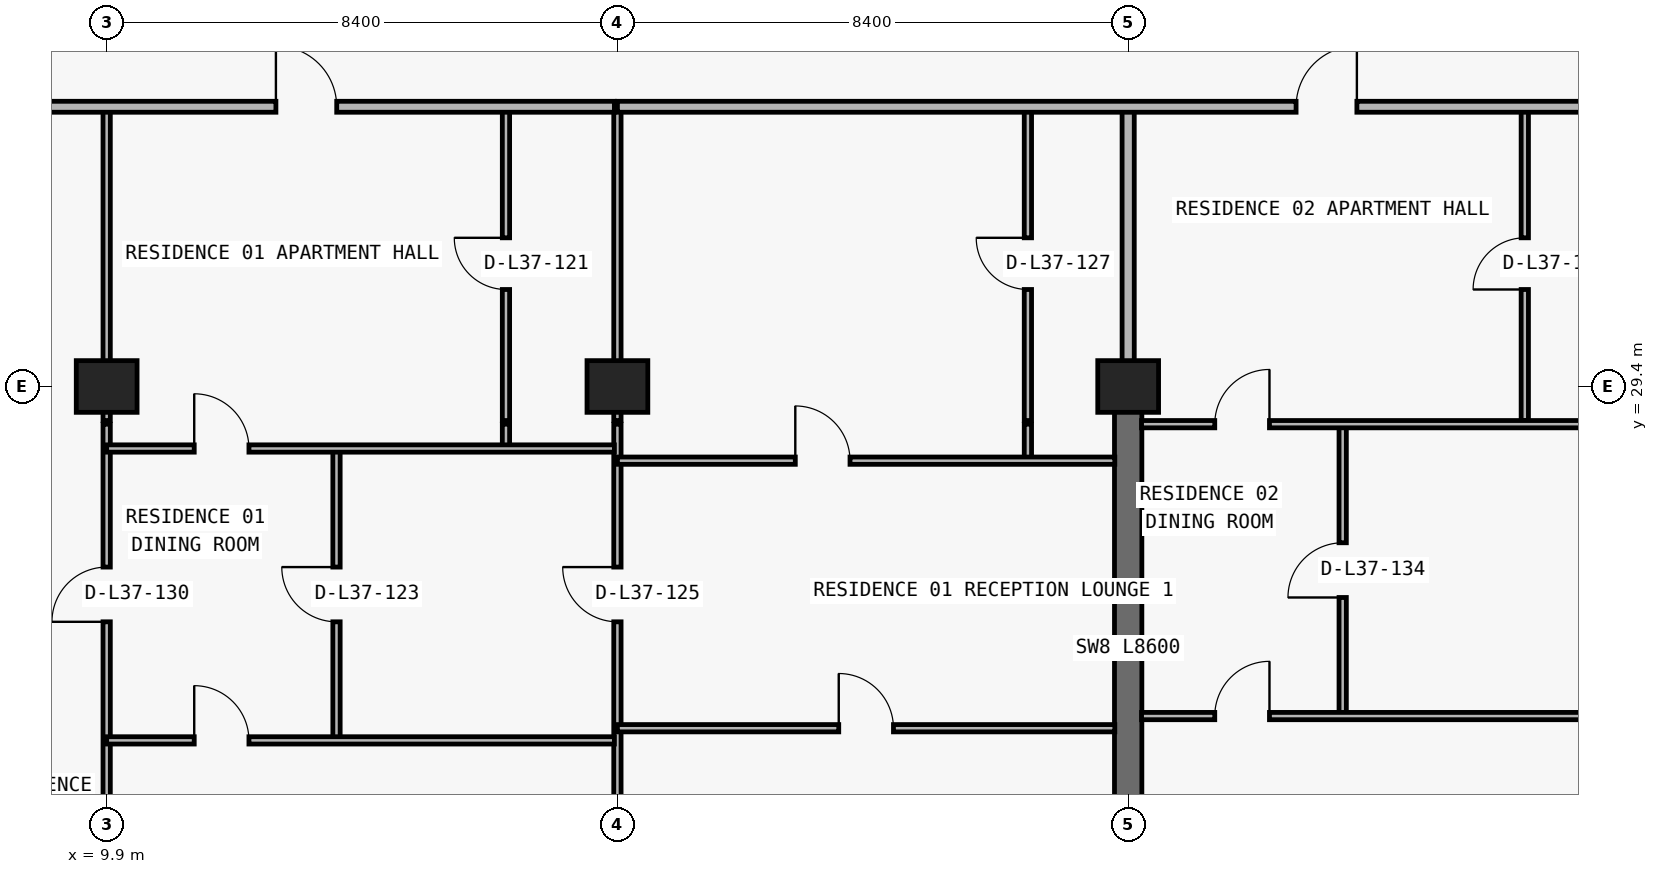
"""IFC4 building model, lengths in metres.
Left out: names, types, materials, properties, quantities, classifications, styles, units other than length and angle.
Written with IfcOpenShell. Run it as: python <this file> out.ifc"""

import sys

from ifc_helpers import new_model, si_unit, direction, frame, frame_2d, origin, origin_2d, place, context, subcontext, project, spatial, rectangle, extrude, element, fill, save


model = new_model("IFC4")
c1 = context("Model", 3, precision=1e-05, world=origin(), true_north=direction((0.0, 1.0)))
c2 = subcontext(c1, "Body", "Model", "MODEL_VIEW")
j1 = project(units=[si_unit("LENGTHUNIT", "METRE"), si_unit("PLANEANGLEUNIT", "RADIAN")], contexts=[c1])
p1 = place(None, origin())
s1 = spatial("IfcSite", under=j1, at=p1, CompositionType="ELEMENT")
p2 = place(p1, origin())
s2 = spatial("IfcBuilding", under=s1, at=p2, CompositionType="ELEMENT")
p3 = place(p2, frame((0.0, 0.0, 135.6)))
s3 = spatial("IfcBuildingStorey", under=s2, at=p3, CompositionType="ELEMENT", Elevation=135.6)
for number, where, z_axis, x_axis in (
    (1, (9.9, 29.4, 0.0), (0.0, 0.0, 1.0), (1.0, 0.0, 0.0)),
    (2, (18.3, 29.4, 0.0), (0.0, 0.0, 1.0), (1.0, 0.0, 0.0)),
    (3, (26.7, 29.4, 0.0), (0.0, 0.0, 1.0), (1.0, 0.0, 0.0)),
):
    element("IfcColumn", number, at=place(p3, frame(where, z_axis=z_axis, x_axis=x_axis)), inside=s3, PredefinedType="COLUMN", context=c2, shape_type="SweptSolid", body=[
        extrude(rectangle(XDim=1.0, YDim=0.85, at=origin_2d()), origin(), (0.0, 0.0, 1.0), 3.05),
    ])
p4 = place(p3, frame((26.7, 20.8, 0.0), z_axis=(0.0, 0.0, 1.0), x_axis=(0.0, 1.0, 0.0)))
e4 = element("IfcWall", 4, at=p4, inside=s3, PredefinedType="SHEAR", context=c2, shape_type="SweptSolid", body=[
    extrude(rectangle(XDim=8.6, YDim=0.45, at=frame_2d((4.3, 0.0))), origin(), (0.0, 0.0, 1.0), 3.05),
])
p5 = place(p3, frame((9.9, 8.84, 0.0), z_axis=(0.0, 0.0, 1.0), x_axis=(0.0, 1.0, 0.0)))
e5 = element("IfcWall", 5, at=p5, inside=s3, PredefinedType="PARTITIONING", context=c2, shape_type="SweptSolid", body=[
    extrude(rectangle(XDim=19.94, YDim=0.12, at=frame_2d((9.97, 0.0))), origin(), (0.0, 0.0, 1.0), 2.174),
])
p6 = place(p5, frame((16.69, 0.0, 0.0)))
e6 = element("IfcOpeningElement", 6, at=p6, cuts=e5, PredefinedType="OPENING", context=c2, shape_type="SweptSolid", body=[
    extrude(rectangle(XDim=0.9, YDim=2.124, at=frame_2d((0.45, 1.062))), frame((0.0, 0.07, 0.0), z_axis=(0.0, -1.0, 0.0), x_axis=(1.0, 0.0, 0.0)), (0.0, 0.0, 1.0), 0.14),
])
p7 = place(p3, frame((9.9, 28.84, 0.0), z_axis=(0.0, 0.0, 1.0), x_axis=(0.0, 1.0, 0.0)))
e7 = element("IfcWall", 7, at=p7, inside=s3, PredefinedType="PARTITIONING", context=c2, shape_type="SweptSolid", body=[
    extrude(rectangle(XDim=5.16, YDim=0.12, at=frame_2d((2.58, 0.0))), origin(), (0.0, 0.0, 1.0), 2.174),
])
p8 = place(p3, frame((13.68, 23.58, 0.0), z_axis=(0.0, 0.0, 1.0), x_axis=(0.0, 1.0, 0.0)))
e8 = element("IfcWall", 8, at=p8, inside=s3, PredefinedType="PARTITIONING", context=c2, shape_type="SweptSolid", body=[
    extrude(rectangle(XDim=4.8, YDim=0.12, at=frame_2d((2.4, 0.0))), origin(), (0.0, 0.0, 1.0), 3.05),
])
p9 = place(p8, frame((1.95, 0.0, 0.0)))
e9 = element("IfcOpeningElement", 9, at=p9, cuts=e8, PredefinedType="OPENING", context=c2, shape_type="SweptSolid", body=[
    extrude(rectangle(XDim=0.9, YDim=2.15, at=frame_2d((0.45, 1.075))), frame((0.0, 0.07, 0.0), z_axis=(0.0, -1.0, 0.0), x_axis=(1.0, 0.0, 0.0)), (0.0, 0.0, 1.0), 0.14),
])
p10 = place(p3, frame((16.467, 28.38, 0.0), z_axis=(0.0, 0.0, 1.0), x_axis=(0.0, 1.0, 0.0)))
e10 = element("IfcWall", 10, at=p10, inside=s3, PredefinedType="PARTITIONING", context=c2, shape_type="SweptSolid", body=[
    extrude(rectangle(XDim=0.4, YDim=0.12, at=frame_2d((0.2, 0.0))), origin(), (0.0, 0.0, 1.0), 2.679),
])
p11 = place(p3, frame((16.467, 28.84, 0.0), z_axis=(0.0, 0.0, 1.0), x_axis=(0.0, 1.0, 0.0)))
e11 = element("IfcWall", 11, at=p11, inside=s3, PredefinedType="PARTITIONING", context=c2, shape_type="SweptSolid", body=[
    extrude(rectangle(XDim=5.16, YDim=0.12, at=frame_2d((2.58, 0.0))), origin(), (0.0, 0.0, 1.0), 2.679),
])
p12 = place(p11, frame((2.155, 0.0, 0.0)))
e12 = element("IfcOpeningElement", 12, at=p12, cuts=e11, PredefinedType="OPENING", context=c2, shape_type="SweptSolid", body=[
    extrude(rectangle(XDim=0.85, YDim=2.1, at=frame_2d((0.425, 1.05))), frame((0.0, 0.07, 0.0), z_axis=(0.0, -1.0, 0.0), x_axis=(1.0, 0.0, 0.0)), (0.0, 0.0, 1.0), 0.14),
])
p13 = place(p3, frame((18.3, 8.84, 0.0), z_axis=(0.0, 0.0, 1.0), x_axis=(0.0, 1.0, 0.0)))
e13 = element("IfcWall", 13, at=p13, inside=s3, PredefinedType="PARTITIONING", context=c2, shape_type="SweptSolid", body=[
    extrude(rectangle(XDim=19.94, YDim=0.12, at=frame_2d((9.97, 0.0))), origin(), (0.0, 0.0, 1.0), 2.174),
])
p14 = place(p13, frame((16.69, 0.0, 0.0)))
e14 = element("IfcOpeningElement", 14, at=p14, cuts=e13, PredefinedType="OPENING", context=c2, shape_type="SweptSolid", body=[
    extrude(rectangle(XDim=0.9, YDim=2.124, at=frame_2d((0.45, 1.062))), frame((0.0, 0.07, 0.0), z_axis=(0.0, -1.0, 0.0), x_axis=(1.0, 0.0, 0.0)), (0.0, 0.0, 1.0), 0.14),
])
p15 = place(p3, frame((18.3, 28.84, 0.0), z_axis=(0.0, 0.0, 1.0), x_axis=(0.0, 1.0, 0.0)))
e15 = element("IfcWall", 15, at=p15, inside=s3, PredefinedType="PARTITIONING", context=c2, shape_type="SweptSolid", body=[
    extrude(rectangle(XDim=5.16, YDim=0.12, at=frame_2d((2.58, 0.0))), origin(), (0.0, 0.0, 1.0), 2.174),
])
p16 = place(p3, frame((25.051, 28.18, 0.0), z_axis=(0.0, 0.0, 1.0), x_axis=(0.0, 1.0, 0.0)))
e16 = element("IfcWall", 16, at=p16, inside=s3, PredefinedType="PARTITIONING", context=c2, shape_type="SweptSolid", body=[
    extrude(rectangle(XDim=0.6, YDim=0.12, at=frame_2d((0.3, 0.0))), origin(), (0.0, 0.0, 1.0), 3.05),
])
p17 = place(p3, frame((25.051, 28.84, 0.0), z_axis=(0.0, 0.0, 1.0), x_axis=(0.0, 1.0, 0.0)))
e17 = element("IfcWall", 17, at=p17, inside=s3, PredefinedType="PARTITIONING", context=c2, shape_type="SweptSolid", body=[
    extrude(rectangle(XDim=5.16, YDim=0.12, at=frame_2d((2.58, 0.0))), origin(), (0.0, 0.0, 1.0), 3.05),
])
p18 = place(p17, frame((2.155, 0.0, 0.0)))
e18 = element("IfcOpeningElement", 18, at=p18, cuts=e17, PredefinedType="OPENING", context=c2, shape_type="SweptSolid", body=[
    extrude(rectangle(XDim=0.85, YDim=2.1, at=frame_2d((0.425, 1.05))), frame((0.0, 0.07, 0.0), z_axis=(0.0, -1.0, 0.0), x_axis=(1.0, 0.0, 0.0)), (0.0, 0.0, 1.0), 0.14),
])
p19 = place(p3, frame((26.7, 29.405, 0.0), z_axis=(0.0, 0.0, 1.0), x_axis=(0.0, 1.0, 0.0)))
e19 = element("IfcWall", 19, at=p19, inside=s3, PredefinedType="PARTITIONING", context=c2, shape_type="SweptSolid", body=[
    extrude(rectangle(XDim=4.595, YDim=0.2, at=frame_2d((2.297, 0.0))), origin(), (0.0, 0.0, 1.0), 2.335),
])
p20 = place(p3, frame((30.228, 23.98, 0.0), z_axis=(0.0, 0.0, 1.0), x_axis=(0.0, 1.0, 0.0)))
e20 = element("IfcWall", 20, at=p20, inside=s3, PredefinedType="PARTITIONING", context=c2, shape_type="SweptSolid", body=[
    extrude(rectangle(XDim=4.8, YDim=0.12, at=frame_2d((2.4, 0.0))), origin(), (0.0, 0.0, 1.0), 3.05),
])
p21 = place(p20, frame((1.95, 0.0, 0.0)))
e21 = element("IfcOpeningElement", 21, at=p21, cuts=e20, PredefinedType="OPENING", context=c2, shape_type="SweptSolid", body=[
    extrude(rectangle(XDim=0.9, YDim=2.15, at=frame_2d((0.45, 1.075))), frame((0.0, 0.07, 0.0), z_axis=(0.0, -1.0, 0.0), x_axis=(1.0, 0.0, 0.0)), (0.0, 0.0, 1.0), 0.14),
])
p22 = place(p3, frame((33.223, 28.84, 0.0), z_axis=(0.0, 0.0, 1.0), x_axis=(0.0, 1.0, 0.0)))
e22 = element("IfcWall", 22, at=p22, inside=s3, PredefinedType="PARTITIONING", context=c2, shape_type="SweptSolid", body=[
    extrude(rectangle(XDim=5.16, YDim=0.12, at=frame_2d((2.58, 0.0))), origin(), (0.0, 0.0, 1.0), 2.679),
])
p23 = place(p22, frame((2.155, 0.0, 0.0)))
e23 = element("IfcOpeningElement", 23, at=p23, cuts=e22, PredefinedType="OPENING", context=c2, shape_type="SweptSolid", body=[
    extrude(rectangle(XDim=0.85, YDim=2.1, at=frame_2d((0.425, 1.05))), frame((0.0, 0.07, 0.0), z_axis=(0.0, -1.0, 0.0), x_axis=(1.0, 0.0, 0.0)), (0.0, 0.0, 1.0), 0.14),
])
p24 = place(p3, frame((9.9, 23.58, 0.0), z_axis=(0.0, 0.0, 1.0), x_axis=(1.0, 0.0, 0.0)))
e24 = element("IfcWall", 24, at=p24, inside=s3, PredefinedType="PARTITIONING", context=c2, shape_type="SweptSolid", body=[
    extrude(rectangle(XDim=8.35, YDim=0.12, at=frame_2d((4.175, 0.0))), origin(), (0.0, 0.0, 1.0), 3.05),
])
p25 = place(p24, frame((1.44, 0.0, 0.0)))
e25 = element("IfcOpeningElement", 25, at=p25, cuts=e24, PredefinedType="OPENING", context=c2, shape_type="SweptSolid", body=[
    extrude(rectangle(XDim=0.9, YDim=2.15, at=frame_2d((0.45, 1.075))), frame((0.0, 0.07, 0.0), z_axis=(0.0, -1.0, 0.0), x_axis=(1.0, 0.0, 0.0)), (0.0, 0.0, 1.0), 0.14),
])
p26 = place(p3, frame((18.3, 23.78, 0.0), z_axis=(0.0, 0.0, 1.0), x_axis=(1.0, 0.0, 0.0)))
e26 = element("IfcWall", 26, at=p26, inside=s3, PredefinedType="PARTITIONING", context=c2, shape_type="SweptSolid", body=[
    extrude(rectangle(XDim=8.18, YDim=0.12, at=frame_2d((4.09, 0.0))), origin(), (0.0, 0.0, 1.0), 3.05),
])
p27 = place(p26, frame((3.64, 0.0, 0.0)))
e27 = element("IfcOpeningElement", 27, at=p27, cuts=e26, PredefinedType="OPENING", context=c2, shape_type="SweptSolid", body=[
    extrude(rectangle(XDim=0.9, YDim=2.15, at=frame_2d((0.45, 1.075))), frame((0.0, 0.07, 0.0), z_axis=(0.0, -1.0, 0.0), x_axis=(1.0, 0.0, 0.0)), (0.0, 0.0, 1.0), 0.14),
])
p28 = place(p3, frame((26.92, 23.98, 0.0), z_axis=(0.0, 0.0, 1.0), x_axis=(1.0, 0.0, 0.0)))
e28 = element("IfcWall", 28, at=p28, inside=s3, PredefinedType="PARTITIONING", context=c2, shape_type="SweptSolid", body=[
    extrude(rectangle(XDim=8.18, YDim=0.12, at=frame_2d((4.09, 0.0))), origin(), (0.0, 0.0, 1.0), 3.05),
])
p29 = place(p28, frame((1.204, 0.0, 0.0)))
e29 = element("IfcOpeningElement", 29, at=p29, cuts=e28, PredefinedType="OPENING", context=c2, shape_type="SweptSolid", body=[
    extrude(rectangle(XDim=0.9, YDim=2.15, at=frame_2d((0.45, 1.075))), frame((0.0, 0.07, 0.0), z_axis=(0.0, -1.0, 0.0), x_axis=(1.0, 0.0, 0.0)), (0.0, 0.0, 1.0), 0.14),
])
p30 = place(p3, frame((18.3, 28.18, 0.0), z_axis=(0.0, 0.0, 1.0), x_axis=(1.0, 0.0, 0.0)))
e30 = element("IfcWall", 30, at=p30, inside=s3, PredefinedType="PARTITIONING", context=c2, shape_type="SweptSolid", body=[
    extrude(rectangle(XDim=8.18, YDim=0.12, at=frame_2d((4.09, 0.0))), origin(), (0.0, 0.0, 1.0), 3.05),
])
p31 = place(p30, frame((2.926, 0.0, 0.0)))
e31 = element("IfcOpeningElement", 31, at=p31, cuts=e30, PredefinedType="OPENING", context=c2, shape_type="SweptSolid", body=[
    extrude(rectangle(XDim=0.9, YDim=2.15, at=frame_2d((0.45, 1.075))), frame((0.0, 0.07, 0.0), z_axis=(0.0, -1.0, 0.0), x_axis=(1.0, 0.0, 0.0)), (0.0, 0.0, 1.0), 0.14),
])
p32 = place(p3, frame((9.9, 28.38, 0.0), z_axis=(0.0, 0.0, 1.0), x_axis=(1.0, 0.0, 0.0)))
e32 = element("IfcWall", 32, at=p32, inside=s3, PredefinedType="PARTITIONING", context=c2, shape_type="SweptSolid", body=[
    extrude(rectangle(XDim=8.35, YDim=0.12, at=frame_2d((4.175, 0.0))), origin(), (0.0, 0.0, 1.0), 3.05),
])
p33 = place(p32, frame((1.44, 0.0, 0.0)))
e33 = element("IfcOpeningElement", 33, at=p33, cuts=e32, PredefinedType="OPENING", context=c2, shape_type="SweptSolid", body=[
    extrude(rectangle(XDim=0.9, YDim=2.15, at=frame_2d((0.45, 1.075))), frame((0.0, 0.07, 0.0), z_axis=(0.0, -1.0, 0.0), x_axis=(1.0, 0.0, 0.0)), (0.0, 0.0, 1.0), 0.14),
])
p34 = place(p3, frame((26.92, 28.78, 0.0), z_axis=(0.0, 0.0, 1.0), x_axis=(1.0, 0.0, 0.0)))
e34 = element("IfcWall", 34, at=p34, inside=s3, PredefinedType="PARTITIONING", context=c2, shape_type="SweptSolid", body=[
    extrude(rectangle(XDim=8.18, YDim=0.12, at=frame_2d((4.09, 0.0))), origin(), (0.0, 0.0, 1.0), 3.05),
])
p35 = place(p34, frame((1.204, 0.0, 0.0)))
e35 = element("IfcOpeningElement", 35, at=p35, cuts=e34, PredefinedType="OPENING", context=c2, shape_type="SweptSolid", body=[
    extrude(rectangle(XDim=0.9, YDim=2.15, at=frame_2d((0.45, 1.075))), frame((0.0, 0.07, 0.0), z_axis=(0.0, -1.0, 0.0), x_axis=(1.0, 0.0, 0.0)), (0.0, 0.0, 1.0), 0.14),
])
p36 = place(p3, frame((7.705, 34.0, 0.0), z_axis=(0.0, 0.0, 1.0), x_axis=(1.0, 0.0, 0.0)))
e36 = element("IfcWall", 36, at=p36, inside=s3, PredefinedType="PARTITIONING", context=c2, shape_type="SweptSolid", body=[
    extrude(rectangle(XDim=10.545, YDim=0.18, at=frame_2d((5.272, 0.0))), origin(), (0.0, 0.0, 1.0), 3.05),
])
p37 = place(p36, frame((4.979, 0.0, 0.0)))
e37 = element("IfcOpeningElement", 37, at=p37, cuts=e36, PredefinedType="OPENING", context=c2, shape_type="SweptSolid", body=[
    extrude(rectangle(XDim=1.0, YDim=2.2, at=frame_2d((0.5, 1.1))), frame((0.0, 0.1, 0.0), z_axis=(0.0, -1.0, 0.0), x_axis=(1.0, 0.0, 0.0)), (0.0, 0.0, 1.0), 0.2),
])
p38 = place(p3, frame((18.3, 34.0, 0.0), z_axis=(0.0, 0.0, 1.0), x_axis=(1.0, 0.0, 0.0)))
e38 = element("IfcWall", 38, at=p38, inside=s3, PredefinedType="PARTITIONING", context=c2, shape_type="SweptSolid", body=[
    extrude(rectangle(XDim=37.586, YDim=0.18, at=frame_2d((18.793, 0.0))), origin(), (0.0, 0.0, 1.0), 3.05),
])
p39 = place(p38, frame((11.162, 0.0, 0.0)))
e39 = element("IfcOpeningElement", 39, at=p39, cuts=e38, PredefinedType="OPENING", context=c2, shape_type="SweptSolid", body=[
    extrude(rectangle(XDim=1.0, YDim=2.2, at=frame_2d((0.5, 1.1))), frame((0.0, 0.1, 0.0), z_axis=(0.0, -1.0, 0.0), x_axis=(1.0, 0.0, 0.0)), (0.0, 0.0, 1.0), 0.2),
])
p40 = place(p38, frame((34.693, 0.0, 0.0)))
e40 = element("IfcOpeningElement", 40, at=p40, cuts=e38, PredefinedType="OPENING", context=c2, shape_type="SweptSolid", body=[
    extrude(rectangle(XDim=1.0, YDim=2.2, at=frame_2d((0.5, 1.1))), frame((0.0, 0.1, 0.0), z_axis=(0.0, -1.0, 0.0), x_axis=(1.0, 0.0, 0.0)), (0.0, 0.0, 1.0), 0.2),
])
p41 = place(p37, origin())
e41 = element("IfcDoor", 41, at=p41, inside=s3, OperationType="SINGLE_SWING_LEFT", PredefinedType="DOOR", context=c2, shape_type="SweptSolid", body=[
    extrude(rectangle(XDim=1.0, YDim=2.2, at=frame_2d((0.5, 1.1))), frame((0.0, 0.025, 0.0), z_axis=(0.0, -1.0, 0.0), x_axis=(1.0, 0.0, 0.0)), (0.0, 0.0, 1.0), 0.05),
])
fill(e37, e41)
p42 = place(p12, origin())
e42 = element("IfcDoor", 42, at=p42, inside=s3, OperationType="SINGLE_SWING_RIGHT", PredefinedType="DOOR", context=c2, shape_type="SweptSolid", body=[
    extrude(rectangle(XDim=0.85, YDim=2.1, at=frame_2d((0.425, 1.05))), frame((0.0, 0.025, 0.0), z_axis=(0.0, -1.0, 0.0), x_axis=(1.0, 0.0, 0.0)), (0.0, 0.0, 1.0), 0.05),
])
fill(e12, e42)
p43 = place(p33, origin())
e43 = element("IfcDoor", 43, at=p43, inside=s3, OperationType="SINGLE_SWING_LEFT", PredefinedType="DOOR", context=c2, shape_type="SweptSolid", body=[
    extrude(rectangle(XDim=0.9, YDim=2.15, at=frame_2d((0.45, 1.075))), frame((0.0, 0.025, 0.0), z_axis=(0.0, -1.0, 0.0), x_axis=(1.0, 0.0, 0.0)), (0.0, 0.0, 1.0), 0.05),
])
fill(e33, e43)
p44 = place(p9, origin())
e44 = element("IfcDoor", 44, at=p44, inside=s3, OperationType="SINGLE_SWING_RIGHT", PredefinedType="DOOR", context=c2, shape_type="SweptSolid", body=[
    extrude(rectangle(XDim=0.9, YDim=2.15, at=frame_2d((0.45, 1.075))), frame((0.0, 0.025, 0.0), z_axis=(0.0, -1.0, 0.0), x_axis=(1.0, 0.0, 0.0)), (0.0, 0.0, 1.0), 0.05),
])
fill(e9, e44)
p45 = place(p25, origin())
e45 = element("IfcDoor", 45, at=p45, inside=s3, OperationType="SINGLE_SWING_LEFT", PredefinedType="DOOR", context=c2, shape_type="SweptSolid", body=[
    extrude(rectangle(XDim=0.9, YDim=2.15, at=frame_2d((0.45, 1.075))), frame((0.0, 0.025, 0.0), z_axis=(0.0, -1.0, 0.0), x_axis=(1.0, 0.0, 0.0)), (0.0, 0.0, 1.0), 0.05),
])
fill(e25, e45)
p46 = place(p14, origin())
e46 = element("IfcDoor", 46, at=p46, inside=s3, OperationType="SINGLE_SWING_RIGHT", PredefinedType="DOOR", context=c2, shape_type="SweptSolid", body=[
    extrude(rectangle(XDim=0.9, YDim=2.124, at=frame_2d((0.45, 1.062))), frame((0.0, 0.025, 0.0), z_axis=(0.0, -1.0, 0.0), x_axis=(1.0, 0.0, 0.0)), (0.0, 0.0, 1.0), 0.05),
])
fill(e14, e46)
p47 = place(p31, origin())
e47 = element("IfcDoor", 47, at=p47, inside=s3, OperationType="SINGLE_SWING_LEFT", PredefinedType="DOOR", context=c2, shape_type="SweptSolid", body=[
    extrude(rectangle(XDim=0.9, YDim=2.15, at=frame_2d((0.45, 1.075))), frame((0.0, 0.025, 0.0), z_axis=(0.0, -1.0, 0.0), x_axis=(1.0, 0.0, 0.0)), (0.0, 0.0, 1.0), 0.05),
])
fill(e31, e47)
p48 = place(p18, origin())
e48 = element("IfcDoor", 48, at=p48, inside=s3, OperationType="SINGLE_SWING_RIGHT", PredefinedType="DOOR", context=c2, shape_type="SweptSolid", body=[
    extrude(rectangle(XDim=0.85, YDim=2.1, at=frame_2d((0.425, 1.05))), frame((0.0, 0.025, 0.0), z_axis=(0.0, -1.0, 0.0), x_axis=(1.0, 0.0, 0.0)), (0.0, 0.0, 1.0), 0.05),
])
fill(e18, e48)
p49 = place(p27, origin())
e49 = element("IfcDoor", 49, at=p49, inside=s3, OperationType="SINGLE_SWING_LEFT", PredefinedType="DOOR", context=c2, shape_type="SweptSolid", body=[
    extrude(rectangle(XDim=0.9, YDim=2.15, at=frame_2d((0.45, 1.075))), frame((0.0, 0.025, 0.0), z_axis=(0.0, -1.0, 0.0), x_axis=(1.0, 0.0, 0.0)), (0.0, 0.0, 1.0), 0.05),
])
fill(e27, e49)
p50 = place(p6, origin())
e50 = element("IfcDoor", 50, at=p50, inside=s3, OperationType="SINGLE_SWING_LEFT", PredefinedType="DOOR", context=c2, shape_type="SweptSolid", body=[
    extrude(rectangle(XDim=0.9, YDim=2.124, at=frame_2d((0.45, 1.062))), frame((0.0, 0.025, 0.0), z_axis=(0.0, -1.0, 0.0), x_axis=(1.0, 0.0, 0.0)), (0.0, 0.0, 1.0), 0.05),
])
fill(e6, e50)
p51 = place(p39, origin())
e51 = element("IfcDoor", 51, at=p51, inside=s3, OperationType="SINGLE_SWING_RIGHT", PredefinedType="DOOR", context=c2, shape_type="SweptSolid", body=[
    extrude(rectangle(XDim=1.0, YDim=2.2, at=frame_2d((0.5, 1.1))), frame((0.0, 0.025, 0.0), z_axis=(0.0, -1.0, 0.0), x_axis=(1.0, 0.0, 0.0)), (0.0, 0.0, 1.0), 0.05),
])
fill(e39, e51)
p52 = place(p23, origin())
e52 = element("IfcDoor", 52, at=p52, inside=s3, OperationType="SINGLE_SWING_LEFT", PredefinedType="DOOR", context=c2, shape_type="SweptSolid", body=[
    extrude(rectangle(XDim=0.85, YDim=2.1, at=frame_2d((0.425, 1.05))), frame((0.0, 0.025, 0.0), z_axis=(0.0, -1.0, 0.0), x_axis=(1.0, 0.0, 0.0)), (0.0, 0.0, 1.0), 0.05),
])
fill(e23, e52)
p53 = place(p35, origin())
e53 = element("IfcDoor", 53, at=p53, inside=s3, OperationType="SINGLE_SWING_RIGHT", PredefinedType="DOOR", context=c2, shape_type="SweptSolid", body=[
    extrude(rectangle(XDim=0.9, YDim=2.15, at=frame_2d((0.45, 1.075))), frame((0.0, 0.025, 0.0), z_axis=(0.0, -1.0, 0.0), x_axis=(1.0, 0.0, 0.0)), (0.0, 0.0, 1.0), 0.05),
])
fill(e35, e53)
p54 = place(p21, origin())
e54 = element("IfcDoor", 54, at=p54, inside=s3, OperationType="SINGLE_SWING_LEFT", PredefinedType="DOOR", context=c2, shape_type="SweptSolid", body=[
    extrude(rectangle(XDim=0.9, YDim=2.15, at=frame_2d((0.45, 1.075))), frame((0.0, 0.025, 0.0), z_axis=(0.0, -1.0, 0.0), x_axis=(1.0, 0.0, 0.0)), (0.0, 0.0, 1.0), 0.05),
])
fill(e21, e54)
p55 = place(p29, origin())
e55 = element("IfcDoor", 55, at=p55, inside=s3, OperationType="SINGLE_SWING_RIGHT", PredefinedType="DOOR", context=c2, shape_type="SweptSolid", body=[
    extrude(rectangle(XDim=0.9, YDim=2.15, at=frame_2d((0.45, 1.075))), frame((0.0, 0.025, 0.0), z_axis=(0.0, -1.0, 0.0), x_axis=(1.0, 0.0, 0.0)), (0.0, 0.0, 1.0), 0.05),
])
fill(e29, e55)
save(model, sys.argv[1])
